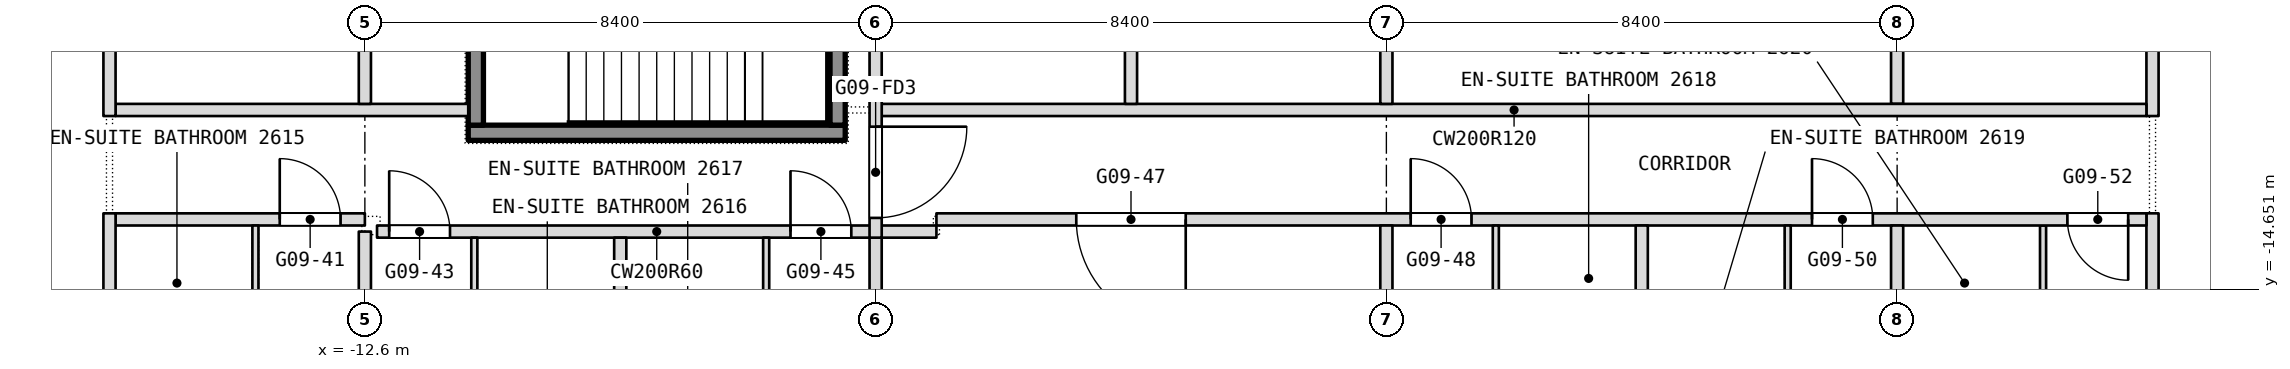
"""IFC4 building model, lengths in metres.
Left out: names, types, materials, properties, quantities, classifications, styles, units other than length and angle.
Written with IfcOpenShell. Run it as: python <this file> out.ifc"""

import sys

from ifc_helpers import new_model, si_unit, direction, frame, frame_2d, origin, place, context, subcontext, project, spatial, rectangle, extrude, element, fill, save


model = new_model("IFC4")
c1 = context("Model", 3, precision=1e-05, world=origin(), true_north=direction((0.0, 1.0)))
c2 = subcontext(c1, "Body", "Model", "MODEL_VIEW")
j1 = project(units=[si_unit("LENGTHUNIT", "METRE"), si_unit("PLANEANGLEUNIT", "RADIAN")], contexts=[c1])
p1 = place(None, origin())
s1 = spatial("IfcSite", under=j1, at=p1, CompositionType="ELEMENT")
p2 = place(p1, origin())
s2 = spatial("IfcBuilding", under=s1, at=p2, CompositionType="ELEMENT")
p3 = place(p2, frame((0.0, 0.0, 119.3)))
s3 = spatial("IfcBuildingStorey", under=s2, at=p3, CompositionType="ELEMENT", Elevation=119.3)
p4 = place(p3, frame((16.8, -22.186, 0.0), z_axis=(0.0, 0.0, 1.0), x_axis=(0.0, 1.0, 0.0)))
e1 = element("IfcWall", 1, at=p4, inside=s3, PredefinedType="PARTITIONING", context=c2, shape_type="SweptSolid", body=[
    extrude(rectangle(XDim=8.786, YDim=0.2, at=frame_2d((4.393, 0.0))), origin(), (0.0, 0.0, 1.0), 3.34),
])
p5 = place(p3, frame((16.8, -11.8, 0.0), z_axis=(0.0, 0.0, 1.0), x_axis=(0.0, 1.0, 0.0)))
e2 = element("IfcWall", 2, at=p5, inside=s3, PredefinedType="PARTITIONING", context=c2, shape_type="SweptSolid", body=[
    extrude(rectangle(XDim=9.9, YDim=0.2, at=frame_2d((4.95, 0.0))), origin(), (0.0, 0.0, 1.0), 3.34),
])
p6 = place(p3, frame((15.0, -16.45, 0.0), z_axis=(0.0, 0.0, 1.0), x_axis=(0.0, 1.0, 0.0)))
e3 = element("IfcWall", 3, at=p6, inside=s3, PredefinedType="PARTITIONING", context=c2, shape_type="SweptSolid", body=[
    extrude(rectangle(XDim=2.85, YDim=0.1, at=frame_2d((1.425, 0.0))), origin(), (0.0, 0.0, 1.0), 3.34),
])
p7 = place(p3, frame((-12.4, -13.7, 0.0), z_axis=(0.0, 0.0, 1.0), x_axis=(1.0, 0.0, 0.0)))
e4 = element("IfcWall", 4, at=p7, inside=s3, PredefinedType="PARTITIONING", context=c2, shape_type="SweptSolid", body=[
    extrude(rectangle(XDim=9.2, YDim=0.2, at=frame_2d((4.6, 0.0))), origin(), (0.0, 0.0, 1.0), 3.34),
])
p8 = place(p7, frame((0.2, 0.0, 0.0)))
e5 = element("IfcOpeningElement", 5, at=p8, cuts=e4, PredefinedType="OPENING", context=c2, shape_type="SweptSolid", body=[
    extrude(rectangle(XDim=1.0, YDim=2.1, at=frame_2d((0.5, 1.05))), frame((0.0, 0.1, 0.0), z_axis=(0.0, -1.0, 0.0), x_axis=(1.0, 0.0, 0.0)), (0.0, 0.0, 1.0), 0.2),
])
p9 = place(p7, frame((6.8, 0.0, 0.0)))
e6 = element("IfcOpeningElement", 6, at=p9, cuts=e4, PredefinedType="OPENING", context=c2, shape_type="SweptSolid", body=[
    extrude(rectangle(XDim=1.0, YDim=2.1, at=frame_2d((0.5, 1.05))), frame((0.0, 0.1, 0.0), z_axis=(0.0, -1.0, 0.0), x_axis=(1.0, 0.0, 0.0)), (0.0, 0.0, 1.0), 0.2),
])
p10 = place(p3, frame((-16.7, -13.5, 0.0), z_axis=(0.0, 0.0, 1.0), x_axis=(1.0, 0.0, 0.0)))
e7 = element("IfcWall", 7, at=p10, inside=s3, PredefinedType="PARTITIONING", context=c2, shape_type="SweptSolid", body=[
    extrude(rectangle(XDim=4.1, YDim=0.2, at=frame_2d((2.05, 0.0))), origin(), (0.0, 0.0, 1.0), 3.34),
])
p11 = place(p10, frame((2.7, 0.0, 0.0)))
e8 = element("IfcOpeningElement", 8, at=p11, cuts=e7, PredefinedType="OPENING", context=c2, shape_type="SweptSolid", body=[
    extrude(rectangle(XDim=1.0, YDim=2.1, at=frame_2d((0.5, 1.05))), frame((0.0, 0.1, 0.0), z_axis=(0.0, -1.0, 0.0), x_axis=(1.0, 0.0, 0.0)), (0.0, 0.0, 1.0), 0.2),
])
p12 = place(p3, frame((-3.2, -13.5, 0.0), z_axis=(0.0, 0.0, 1.0), x_axis=(1.0, 0.0, 0.0)))
e9 = element("IfcWall", 9, at=p12, inside=s3, PredefinedType="PARTITIONING", context=c2, shape_type="SweptSolid", body=[
    extrude(rectangle(XDim=19.9, YDim=0.2, at=frame_2d((9.95, 0.0))), origin(), (0.0, 0.0, 1.0), 3.34),
])
p13 = place(p12, frame((2.3, 0.0, 0.0)))
e10 = element("IfcOpeningElement", 10, at=p13, cuts=e9, PredefinedType="OPENING", context=c2, shape_type="SweptSolid", body=[
    extrude(rectangle(XDim=1.8, YDim=2.1, at=frame_2d((0.9, 1.05))), frame((0.0, 0.1, 0.0), z_axis=(0.0, -1.0, 0.0), x_axis=(1.0, 0.0, 0.0)), (0.0, 0.0, 1.0), 0.2),
])
p14 = place(p12, frame((7.8, 0.0, 0.0)))
e11 = element("IfcOpeningElement", 11, at=p14, cuts=e9, PredefinedType="OPENING", context=c2, shape_type="SweptSolid", body=[
    extrude(rectangle(XDim=1.0, YDim=2.1, at=frame_2d((0.5, 1.05))), frame((0.0, 0.1, 0.0), z_axis=(0.0, -1.0, 0.0), x_axis=(1.0, 0.0, 0.0)), (0.0, 0.0, 1.0), 0.2),
])
p15 = place(p12, frame((14.4, 0.0, 0.0)))
e12 = element("IfcOpeningElement", 12, at=p15, cuts=e9, PredefinedType="OPENING", context=c2, shape_type="SweptSolid", body=[
    extrude(rectangle(XDim=1.0, YDim=2.1, at=frame_2d((0.5, 1.05))), frame((0.0, 0.1, 0.0), z_axis=(0.0, -1.0, 0.0), x_axis=(1.0, 0.0, 0.0)), (0.0, 0.0, 1.0), 0.2),
])
p16 = place(p12, frame((18.6, 0.0, 0.0)))
e13 = element("IfcOpeningElement", 13, at=p16, cuts=e9, PredefinedType="OPENING", context=c2, shape_type="SweptSolid", body=[
    extrude(rectangle(XDim=1.0, YDim=2.1, at=frame_2d((0.5, 1.05))), frame((0.0, 0.1, 0.0), z_axis=(0.0, -1.0, 0.0), x_axis=(1.0, 0.0, 0.0)), (0.0, 0.0, 1.0), 0.2),
])
p17 = place(p3, frame((12.6, -21.175, 0.0), z_axis=(0.0, 0.0, 1.0), x_axis=(0.0, 1.0, 0.0)))
e14 = element("IfcWall", 14, at=p17, inside=s3, PredefinedType="PARTITIONING", context=c2, shape_type="SweptSolid", body=[
    extrude(rectangle(XDim=7.575, YDim=0.2, at=frame_2d((3.788, 0.0))), origin(), (0.0, 0.0, 1.0), 3.34),
])
p18 = place(p3, frame((12.6, -11.6, 0.0), z_axis=(0.0, 0.0, 1.0), x_axis=(0.0, 1.0, 0.0)))
e15 = element("IfcWall", 15, at=p18, inside=s3, PredefinedType="PARTITIONING", context=c2, shape_type="SweptSolid", body=[
    extrude(rectangle(XDim=3.9, YDim=0.2, at=frame_2d((1.95, 0.0))), origin(), (0.0, 0.0, 1.0), 3.34),
])
p19 = place(p3, frame((-16.7, -11.7, 0.0), z_axis=(0.0, 0.0, 1.0), x_axis=(1.0, 0.0, 0.0)))
e16 = element("IfcWall", 16, at=p19, inside=s3, PredefinedType="PARTITIONING", context=c2, shape_type="SweptSolid", body=[
    extrude(rectangle(XDim=5.8, YDim=0.2, at=frame_2d((2.9, 0.0))), origin(), (0.0, 0.0, 1.0), 3.34),
])
p20 = place(p3, frame((-4.1, -11.7, 0.0), z_axis=(0.0, 0.0, 1.0), x_axis=(1.0, 0.0, 0.0)))
e17 = element("IfcWall", 17, at=p20, inside=s3, PredefinedType="PARTITIONING", context=c2, shape_type="SweptSolid", body=[
    extrude(rectangle(XDim=20.8, YDim=0.2, at=frame_2d((10.4, 0.0))), origin(), (0.0, 0.0, 1.0), 3.34),
])
p21 = place(p3, frame((10.8, -17.35, 0.0), z_axis=(0.0, 0.0, 1.0), x_axis=(0.0, 1.0, 0.0)))
e18 = element("IfcWall", 18, at=p21, inside=s3, PredefinedType="PARTITIONING", context=c2, shape_type="SweptSolid", body=[
    extrude(rectangle(XDim=3.75, YDim=0.1, at=frame_2d((1.875, 0.0))), origin(), (0.0, 0.0, 1.0), 3.34),
])
p22 = place(p3, frame((8.4, -23.3, 0.0), z_axis=(0.0, 0.0, 1.0), x_axis=(0.0, 1.0, 0.0)))
e19 = element("IfcWall", 19, at=p22, inside=s3, PredefinedType="PARTITIONING", context=c2, shape_type="SweptSolid", body=[
    extrude(rectangle(XDim=9.7, YDim=0.2, at=frame_2d((4.85, 0.0))), origin(), (0.0, 0.0, 1.0), 3.34),
])
p23 = place(p3, frame((6.0, -17.45, 0.0), z_axis=(0.0, 0.0, 1.0), x_axis=(0.0, 1.0, 0.0)))
e20 = element("IfcWall", 20, at=p23, inside=s3, PredefinedType="PARTITIONING", context=c2, shape_type="SweptSolid", body=[
    extrude(rectangle(XDim=3.85, YDim=0.1, at=frame_2d((1.925, 0.0))), origin(), (0.0, 0.0, 1.0), 3.34),
])
p24 = place(p23, frame((1.355, 0.0, 0.0)))
e21 = element("IfcOpeningElement", 21, at=p24, cuts=e20, PredefinedType="OPENING", context=c2, shape_type="SweptSolid", body=[
    extrude(rectangle(XDim=0.9, YDim=2.1, at=frame_2d((0.45, 1.05))), frame((0.0, 0.05, 0.0), z_axis=(0.0, -1.0, 0.0), x_axis=(1.0, 0.0, 0.0)), (0.0, 0.0, 1.0), 0.1),
])
p25 = place(p3, frame((4.2, -23.3, 0.0), z_axis=(0.0, 0.0, 1.0), x_axis=(0.0, 1.0, 0.0)))
e22 = element("IfcWall", 22, at=p25, inside=s3, PredefinedType="PARTITIONING", context=c2, shape_type="SweptSolid", body=[
    extrude(rectangle(XDim=9.7, YDim=0.2, at=frame_2d((4.85, 0.0))), origin(), (0.0, 0.0, 1.0), 3.34),
])
for number, where, z_axis, x_axis in (
    (23, (4.2, -11.6, 0.0), (0.0, 0.0, 1.0), (0.0, 1.0, 0.0)),
    (24, (0.0, -11.6, 0.0), (0.0, 0.0, 1.0), (0.0, 1.0, 0.0)),
):
    element("IfcWall", number, at=place(p3, frame(where, z_axis=z_axis, x_axis=x_axis)), inside=s3, PredefinedType="PARTITIONING", context=c2, shape_type="SweptSolid", body=[
        extrude(rectangle(XDim=9.7, YDim=0.2, at=frame_2d((4.85, 0.0))), origin(), (0.0, 0.0, 1.0), 3.34),
    ])
p26 = place(p3, frame((-4.2, -23.3, 0.0), z_axis=(0.0, 0.0, 1.0), x_axis=(0.0, 1.0, 0.0)))
e25 = element("IfcWall", 25, at=p26, inside=s3, PredefinedType="PARTITIONING", context=c2, shape_type="SweptSolid", body=[
    extrude(rectangle(XDim=9.5, YDim=0.2, at=frame_2d((4.75, 0.0))), origin(), (0.0, 0.0, 1.0), 3.34),
])
p27 = place(p3, frame((-4.2, -13.8, 0.0), z_axis=(0.0, 0.0, 1.0), x_axis=(0.0, 1.0, 0.0)))
e26 = element("IfcWall", 26, at=p27, inside=s3, PredefinedType="PARTITIONING", context=c2, shape_type="SweptSolid", body=[
    extrude(rectangle(XDim=13.8, YDim=0.2, at=frame_2d((6.9, 0.0))), origin(), (0.0, 0.0, 1.0), 3.34),
])
p28 = place(p27, frame((12.15, 0.0, 0.0)))
e27 = element("IfcOpeningElement", 27, at=p28, cuts=e26, PredefinedType="OPENING", context=c2, shape_type="SweptSolid", body=[
    extrude(rectangle(XDim=1.5, YDim=2.1, at=frame_2d((0.75, 1.05))), frame((0.0, 0.1, 0.0), z_axis=(0.0, -1.0, 0.0), x_axis=(1.0, 0.0, 0.0)), (0.0, 0.0, 1.0), 0.2),
])
p29 = place(p27, frame((0.325, 0.0, 0.0)))
e28 = element("IfcOpeningElement", 28, at=p29, cuts=e26, PredefinedType="OPENING", context=c2, shape_type="SweptSolid", body=[
    extrude(rectangle(XDim=1.5, YDim=2.1, at=frame_2d((0.75, 1.05))), frame((0.0, 0.1, 0.0), z_axis=(0.0, -1.0, 0.0), x_axis=(1.0, 0.0, 0.0)), (0.0, 0.0, 1.0), 0.2),
])
p30 = place(p3, frame((-6.0, -16.65, 0.0), z_axis=(0.0, 0.0, 1.0), x_axis=(0.0, 1.0, 0.0)))
e29 = element("IfcWall", 29, at=p30, inside=s3, PredefinedType="PARTITIONING", context=c2, shape_type="SweptSolid", body=[
    extrude(rectangle(XDim=2.85, YDim=0.1, at=frame_2d((1.425, 0.0))), origin(), (0.0, 0.0, 1.0), 3.34),
])
p31 = place(p3, frame((-8.4, -23.3, 0.0), z_axis=(0.0, 0.0, 1.0), x_axis=(0.0, 1.0, 0.0)))
e30 = element("IfcWall", 30, at=p31, inside=s3, PredefinedType="PARTITIONING", context=c2, shape_type="SweptSolid", body=[
    extrude(rectangle(XDim=9.5, YDim=0.2, at=frame_2d((4.75, 0.0))), origin(), (0.0, 0.0, 1.0), 3.34),
])
p32 = place(p3, frame((-10.8, -17.65, 0.0), z_axis=(0.0, 0.0, 1.0), x_axis=(0.0, 1.0, 0.0)))
e31 = element("IfcWall", 31, at=p32, inside=s3, PredefinedType="PARTITIONING", context=c2, shape_type="SweptSolid", body=[
    extrude(rectangle(XDim=3.85, YDim=0.1, at=frame_2d((1.925, 0.0))), origin(), (0.0, 0.0, 1.0), 3.34),
])
p33 = place(p3, frame((-12.6, -21.175, 0.0), z_axis=(0.0, 0.0, 1.0), x_axis=(0.0, 1.0, 0.0)))
e32 = element("IfcWall", 32, at=p33, inside=s3, PredefinedType="PARTITIONING", context=c2, shape_type="SweptSolid", body=[
    extrude(rectangle(XDim=7.475, YDim=0.2, at=frame_2d((3.738, 0.0))), origin(), (0.0, 0.0, 1.0), 3.34),
])
p34 = place(p3, frame((-12.6, -11.6, 0.0), z_axis=(0.0, 0.0, 1.0), x_axis=(0.0, 1.0, 0.0)))
e33 = element("IfcWall", 33, at=p34, inside=s3, PredefinedType="PARTITIONING", context=c2, shape_type="SweptSolid", body=[
    extrude(rectangle(XDim=9.7, YDim=0.2, at=frame_2d((4.85, 0.0))), origin(), (0.0, 0.0, 1.0), 3.34),
])
p35 = place(p3, frame((-14.4, -16.45, 0.0), z_axis=(0.0, 0.0, 1.0), x_axis=(0.0, 1.0, 0.0)))
e34 = element("IfcWall", 34, at=p35, inside=s3, PredefinedType="PARTITIONING", context=c2, shape_type="SweptSolid", body=[
    extrude(rectangle(XDim=2.85, YDim=0.1, at=frame_2d((1.425, 0.0))), origin(), (0.0, 0.0, 1.0), 3.34),
])
p36 = place(p3, frame((-16.8, -22.186, 0.0), z_axis=(0.0, 0.0, 1.0), x_axis=(0.0, 1.0, 0.0)))
e35 = element("IfcWall", 35, at=p36, inside=s3, PredefinedType="PARTITIONING", context=c2, shape_type="SweptSolid", body=[
    extrude(rectangle(XDim=8.786, YDim=0.2, at=frame_2d((4.393, 0.0))), origin(), (0.0, 0.0, 1.0), 3.34),
])
p37 = place(p3, frame((-16.8, -11.8, 0.0), z_axis=(0.0, 0.0, 1.0), x_axis=(0.0, 1.0, 0.0)))
e36 = element("IfcWall", 36, at=p37, inside=s3, PredefinedType="PARTITIONING", context=c2, shape_type="SweptSolid", body=[
    extrude(rectangle(XDim=9.9, YDim=0.2, at=frame_2d((4.95, 0.0))), origin(), (0.0, 0.0, 1.0), 3.34),
])
p38 = place(p3, frame((-10.9, -12.075, 0.1), z_axis=(0.0, 0.0, 1.0), x_axis=(1.0, 0.0, 0.0)))
e37 = element("IfcWall", 37, at=p38, inside=s3, PredefinedType="SHEAR", context=c2, shape_type="SweptSolid", body=[
    extrude(rectangle(XDim=6.2, YDim=0.25, at=frame_2d((3.1, 0.0))), origin(), (0.0, 0.0, 1.0), 3.6),
])
for number, where, z_axis, x_axis in (
    (38, (-10.775, -11.95, 0.1), (0.0, 0.0, 1.0), (0.0, 1.0, 0.0)),
    (39, (-4.825, -11.95, 0.1), (0.0, 0.0, 1.0), (0.0, 1.0, 0.0)),
):
    element("IfcWall", number, at=place(p3, frame(where, z_axis=z_axis, x_axis=x_axis)), inside=s3, PredefinedType="SHEAR", context=c2, shape_type="SweptSolid", body=[
        extrude(rectangle(XDim=2.9, YDim=0.25, at=frame_2d((1.45, 0.0))), origin(), (0.0, 0.0, 1.0), 3.6),
    ])
p39 = place(p8, origin())
e40 = element("IfcDoor", 40, at=p39, inside=s3, OperationType="SINGLE_SWING_RIGHT", PredefinedType="DOOR", context=c2, shape_type="SweptSolid", body=[
    extrude(rectangle(XDim=1.0, YDim=2.1, at=frame_2d((0.5, 1.05))), frame((0.0, 0.025, 0.0), z_axis=(0.0, -1.0, 0.0), x_axis=(1.0, 0.0, 0.0)), (0.0, 0.0, 1.0), 0.05),
])
fill(e5, e40)
p40 = place(p9, origin())
e41 = element("IfcDoor", 41, at=p40, inside=s3, OperationType="SINGLE_SWING_LEFT", PredefinedType="DOOR", context=c2, shape_type="SweptSolid", body=[
    extrude(rectangle(XDim=1.0, YDim=2.1, at=frame_2d((0.5, 1.05))), frame((0.0, 0.025, 0.0), z_axis=(0.0, -1.0, 0.0), x_axis=(1.0, 0.0, 0.0)), (0.0, 0.0, 1.0), 0.05),
])
fill(e6, e41)
p41 = place(p11, origin())
e42 = element("IfcDoor", 42, at=p41, inside=s3, OperationType="SINGLE_SWING_LEFT", PredefinedType="DOOR", context=c2, shape_type="SweptSolid", body=[
    extrude(rectangle(XDim=1.0, YDim=2.1, at=frame_2d((0.5, 1.05))), frame((0.0, 0.025, 0.0), z_axis=(0.0, -1.0, 0.0), x_axis=(1.0, 0.0, 0.0)), (0.0, 0.0, 1.0), 0.05),
])
fill(e8, e42)
p42 = place(p13, origin())
e43 = element("IfcDoor", 43, at=p42, inside=s3, OperationType="DOUBLE_DOOR_SINGLE_SWING", PredefinedType="DOOR", context=c2, shape_type="SweptSolid", body=[
    extrude(rectangle(XDim=1.8, YDim=2.1, at=frame_2d((0.9, 1.05))), frame((0.0, 0.025, 0.0), z_axis=(0.0, -1.0, 0.0), x_axis=(1.0, 0.0, 0.0)), (0.0, 0.0, 1.0), 0.05),
])
fill(e10, e43)
p43 = place(p14, origin())
e44 = element("IfcDoor", 44, at=p43, inside=s3, OperationType="SINGLE_SWING_RIGHT", PredefinedType="DOOR", context=c2, shape_type="SweptSolid", body=[
    extrude(rectangle(XDim=1.0, YDim=2.1, at=frame_2d((0.5, 1.05))), frame((0.0, 0.025, 0.0), z_axis=(0.0, -1.0, 0.0), x_axis=(1.0, 0.0, 0.0)), (0.0, 0.0, 1.0), 0.05),
])
fill(e11, e44)
p44 = place(p15, origin())
e45 = element("IfcDoor", 45, at=p44, inside=s3, OperationType="SINGLE_SWING_RIGHT", PredefinedType="DOOR", context=c2, shape_type="SweptSolid", body=[
    extrude(rectangle(XDim=1.0, YDim=2.1, at=frame_2d((0.5, 1.05))), frame((0.0, 0.025, 0.0), z_axis=(0.0, -1.0, 0.0), x_axis=(1.0, 0.0, 0.0)), (0.0, 0.0, 1.0), 0.05),
])
fill(e12, e45)
p45 = place(p16, origin())
e46 = element("IfcDoor", 46, at=p45, inside=s3, OperationType="SINGLE_SWING_LEFT", PredefinedType="DOOR", context=c2, shape_type="SweptSolid", body=[
    extrude(rectangle(XDim=1.0, YDim=2.1, at=frame_2d((0.5, 1.05))), frame((0.0, 0.025, 0.0), z_axis=(0.0, -1.0, 0.0), x_axis=(1.0, 0.0, 0.0)), (0.0, 0.0, 1.0), 0.05),
])
fill(e13, e46)
p46 = place(p29, origin())
e47 = element("IfcDoor", 47, at=p46, inside=s3, OperationType="DOUBLE_DOOR_DOUBLE_SWING", PredefinedType="DOOR", context=c2, shape_type="SweptSolid", body=[
    extrude(rectangle(XDim=1.5, YDim=2.1, at=frame_2d((0.75, 1.05))), frame((0.0, 0.025, 0.0), z_axis=(0.0, -1.0, 0.0), x_axis=(1.0, 0.0, 0.0)), (0.0, 0.0, 1.0), 0.05),
])
fill(e28, e47)
save(model, sys.argv[1])
